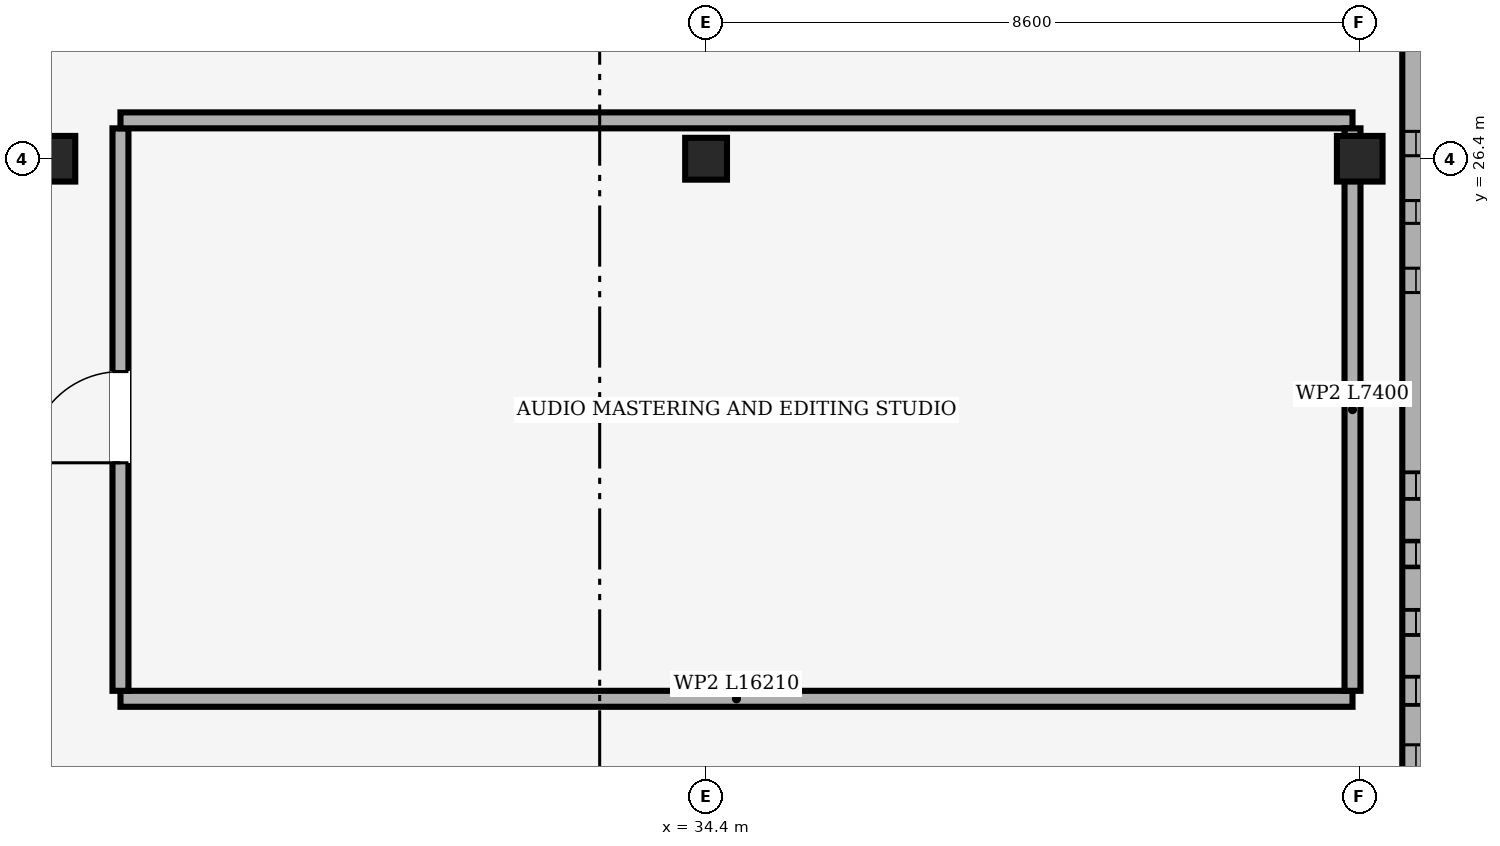
"""IFC4 building model, lengths in metres.
Left out: names, types, materials, properties, quantities, classifications, styles, units other than length and angle.
Written with IfcOpenShell. Run it as: python <this file> out.ifc"""

import sys

from ifc_helpers import new_model, si_unit, direction, frame, frame_2d, origin, origin_2d, place, context, subcontext, project, spatial, rectangle, extrude, element, fill, save


model = new_model("IFC4")
c1 = context("Model", 3, precision=1e-05, world=origin(), true_north=direction((0.0, 1.0)))
c2 = subcontext(c1, "Body", "Model", "MODEL_VIEW")
j1 = project(units=[si_unit("LENGTHUNIT", "METRE"), si_unit("PLANEANGLEUNIT", "RADIAN")], contexts=[c1])
p1 = place(None, origin())
s1 = spatial("IfcSite", under=j1, at=p1, CompositionType="ELEMENT")
p2 = place(p1, origin())
s2 = spatial("IfcBuilding", under=s1, at=p2, CompositionType="ELEMENT")
p3 = place(p2, frame((0.0, 0.0, 22.35)))
s3 = spatial("IfcBuildingStorey", under=s2, at=p3, CompositionType="ELEMENT", Elevation=22.35)
p4 = place(p3, frame((25.8, 26.4, 0.0), z_axis=(0.0, 0.0, 1.0), x_axis=(1.0, 0.0, 0.0)))
e1 = element("IfcColumn", 1, at=p4, inside=s3, PredefinedType="COLUMN", context=c2, shape_type="SweptSolid", body=[
    extrude(rectangle(XDim=0.6, YDim=0.6, at=origin_2d()), origin(), (0.0, 0.0, 1.0), 2.91),
])
p5 = place(p3, frame((34.4, 26.4, 0.0), z_axis=(0.0, 0.0, 1.0), x_axis=(1.0, 0.0, 0.0)))
e2 = element("IfcColumn", 2, at=p5, inside=s3, PredefinedType="COLUMN", context=c2, shape_type="SweptSolid", body=[
    extrude(rectangle(XDim=0.55, YDim=0.55, at=origin_2d()), origin(), (0.0, 0.0, 1.0), 2.91),
])
p6 = place(p3, frame((43.0, 26.4, 0.0), z_axis=(0.0, 0.0, 1.0), x_axis=(1.0, 0.0, 0.0)))
e3 = element("IfcColumn", 3, at=p6, inside=s3, PredefinedType="COLUMN", context=c2, shape_type="SweptSolid", body=[
    extrude(rectangle(XDim=0.6, YDim=0.6, at=origin_2d()), origin(), (0.0, 0.0, 1.0), 2.91),
])
p7 = place(p3, frame((43.74, 35.94, 0.0), z_axis=(0.0, 0.0, 1.0), x_axis=(0.0, -1.0, 0.0)))
e4 = element("IfcWall", 4, at=p7, inside=s3, PredefinedType="SOLIDWALL", context=c2, shape_type="SweptSolid", body=[
    extrude(rectangle(XDim=36.68, YDim=0.36, at=frame_2d((18.34, 0.0))), origin(), (0.0, 0.0, 1.0), 2.91),
])
p8 = place(p7, frame((9.18, 0.0, 0.36)))
e5 = element("IfcOpeningElement", 5, at=p8, cuts=e4, PredefinedType="OPENING", context=c2, shape_type="SweptSolid", body=[
    extrude(rectangle(XDim=0.32, YDim=0.32, at=frame_2d((0.16, 0.16))), frame((0.0, 0.18, 0.0), z_axis=(0.0, -1.0, 0.0), x_axis=(1.0, 0.0, 0.0)), (0.0, 0.0, 1.0), 0.36),
])
p9 = place(p7, frame((10.09, 0.0, 1.26)))
e6 = element("IfcOpeningElement", 6, at=p9, cuts=e4, PredefinedType="OPENING", context=c2, shape_type="SweptSolid", body=[
    extrude(rectangle(XDim=0.3, YDim=0.3, at=frame_2d((0.15, 0.15))), frame((0.0, 0.18, 0.0), z_axis=(0.0, -1.0, 0.0), x_axis=(1.0, 0.0, 0.0)), (0.0, 0.0, 1.0), 0.36),
])
p10 = place(p7, frame((10.98, 0.0, 1.26)))
e7 = element("IfcOpeningElement", 7, at=p10, cuts=e4, PredefinedType="OPENING", context=c2, shape_type="SweptSolid", body=[
    extrude(rectangle(XDim=0.32, YDim=0.32, at=frame_2d((0.16, 0.16))), frame((0.0, 0.18, 0.0), z_axis=(0.0, -1.0, 0.0), x_axis=(1.0, 0.0, 0.0)), (0.0, 0.0, 1.0), 0.36),
])
p11 = place(p7, frame((13.66, 0.0, 0.36)))
e8 = element("IfcOpeningElement", 8, at=p11, cuts=e4, PredefinedType="OPENING", context=c2, shape_type="SweptSolid", body=[
    extrude(rectangle(XDim=0.36, YDim=0.36, at=frame_2d((0.18, 0.18))), frame((0.0, 0.18, 0.0), z_axis=(0.0, -1.0, 0.0), x_axis=(1.0, 0.0, 0.0)), (0.0, 0.0, 1.0), 0.36),
])
p12 = place(p7, frame((13.67, 0.0, 1.26)))
e9 = element("IfcOpeningElement", 9, at=p12, cuts=e4, PredefinedType="OPENING", context=c2, shape_type="SweptSolid", body=[
    extrude(rectangle(XDim=0.34, YDim=0.34, at=frame_2d((0.17, 0.17))), frame((0.0, 0.18, 0.0), z_axis=(0.0, -1.0, 0.0), x_axis=(1.0, 0.0, 0.0)), (0.0, 0.0, 1.0), 0.36),
])
p13 = place(p7, frame((14.56, 0.0, 0.36)))
e10 = element("IfcOpeningElement", 10, at=p13, cuts=e4, PredefinedType="OPENING", context=c2, shape_type="SweptSolid", body=[
    extrude(rectangle(XDim=0.36, YDim=0.36, at=frame_2d((0.18, 0.18))), frame((0.0, 0.18, 0.0), z_axis=(0.0, -1.0, 0.0), x_axis=(1.0, 0.0, 0.0)), (0.0, 0.0, 1.0), 0.36),
])
p14 = place(p7, frame((14.58, 0.0, 2.16)))
e11 = element("IfcOpeningElement", 11, at=p14, cuts=e4, PredefinedType="OPENING", context=c2, shape_type="SweptSolid", body=[
    extrude(rectangle(XDim=0.32, YDim=0.32, at=frame_2d((0.16, 0.16))), frame((0.0, 0.18, 0.0), z_axis=(0.0, -1.0, 0.0), x_axis=(1.0, 0.0, 0.0)), (0.0, 0.0, 1.0), 0.36),
])
p15 = place(p7, frame((15.47, 0.0, 1.26)))
e12 = element("IfcOpeningElement", 12, at=p15, cuts=e4, PredefinedType="OPENING", context=c2, shape_type="SweptSolid", body=[
    extrude(rectangle(XDim=0.34, YDim=0.34, at=frame_2d((0.17, 0.17))), frame((0.0, 0.18, 0.0), z_axis=(0.0, -1.0, 0.0), x_axis=(1.0, 0.0, 0.0)), (0.0, 0.0, 1.0), 0.36),
])
p16 = place(p7, frame((15.48, 0.0, 2.16)))
e13 = element("IfcOpeningElement", 13, at=p16, cuts=e4, PredefinedType="OPENING", context=c2, shape_type="SweptSolid", body=[
    extrude(rectangle(XDim=0.32, YDim=0.32, at=frame_2d((0.16, 0.16))), frame((0.0, 0.18, 0.0), z_axis=(0.0, -1.0, 0.0), x_axis=(1.0, 0.0, 0.0)), (0.0, 0.0, 1.0), 0.36),
])
p17 = place(p7, frame((16.35, 0.0, 0.36)))
e14 = element("IfcOpeningElement", 14, at=p17, cuts=e4, PredefinedType="OPENING", context=c2, shape_type="SweptSolid", body=[
    extrude(rectangle(XDim=0.38, YDim=0.38, at=frame_2d((0.19, 0.19))), frame((0.0, 0.18, 0.0), z_axis=(0.0, -1.0, 0.0), x_axis=(1.0, 0.0, 0.0)), (0.0, 0.0, 1.0), 0.36),
])
p18 = place(p7, frame((16.36, 0.0, 1.26)))
e15 = element("IfcOpeningElement", 15, at=p18, cuts=e4, PredefinedType="OPENING", context=c2, shape_type="SweptSolid", body=[
    extrude(rectangle(XDim=0.36, YDim=0.36, at=frame_2d((0.18, 0.18))), frame((0.0, 0.18, 0.0), z_axis=(0.0, -1.0, 0.0), x_axis=(1.0, 0.0, 0.0)), (0.0, 0.0, 1.0), 0.36),
])
p19 = place(p7, frame((17.25, 0.0, 0.36)))
e16 = element("IfcOpeningElement", 16, at=p19, cuts=e4, PredefinedType="OPENING", context=c2, shape_type="SweptSolid", body=[
    extrude(rectangle(XDim=0.38, YDim=0.38, at=frame_2d((0.19, 0.19))), frame((0.0, 0.18, 0.0), z_axis=(0.0, -1.0, 0.0), x_axis=(1.0, 0.0, 0.0)), (0.0, 0.0, 1.0), 0.36),
])
p20 = place(p7, frame((18.16, 0.0, 1.26)))
e17 = element("IfcOpeningElement", 17, at=p20, cuts=e4, PredefinedType="OPENING", context=c2, shape_type="SweptSolid", body=[
    extrude(rectangle(XDim=0.36, YDim=0.36, at=frame_2d((0.18, 0.18))), frame((0.0, 0.18, 0.0), z_axis=(0.0, -1.0, 0.0), x_axis=(1.0, 0.0, 0.0)), (0.0, 0.0, 1.0), 0.36),
])
p21 = place(p7, frame((18.18, 0.0, 2.16)))
e18 = element("IfcOpeningElement", 18, at=p21, cuts=e4, PredefinedType="OPENING", context=c2, shape_type="SweptSolid", body=[
    extrude(rectangle(XDim=0.32, YDim=0.32, at=frame_2d((0.16, 0.16))), frame((0.0, 0.18, 0.0), z_axis=(0.0, -1.0, 0.0), x_axis=(1.0, 0.0, 0.0)), (0.0, 0.0, 1.0), 0.36),
])
p22 = place(p7, frame((19.05, 0.0, 0.36)))
e19 = element("IfcOpeningElement", 19, at=p22, cuts=e4, PredefinedType="OPENING", context=c2, shape_type="SweptSolid", body=[
    extrude(rectangle(XDim=0.38, YDim=0.38, at=frame_2d((0.19, 0.19))), frame((0.0, 0.18, 0.0), z_axis=(0.0, -1.0, 0.0), x_axis=(1.0, 0.0, 0.0)), (0.0, 0.0, 1.0), 0.36),
])
p23 = place(p7, frame((19.06, 0.0, 1.26)))
e20 = element("IfcOpeningElement", 20, at=p23, cuts=e4, PredefinedType="OPENING", context=c2, shape_type="SweptSolid", body=[
    extrude(rectangle(XDim=0.36, YDim=0.36, at=frame_2d((0.18, 0.18))), frame((0.0, 0.18, 0.0), z_axis=(0.0, -1.0, 0.0), x_axis=(1.0, 0.0, 0.0)), (0.0, 0.0, 1.0), 0.36),
])
p24 = place(p7, frame((19.95, 0.0, 0.36)))
e21 = element("IfcOpeningElement", 21, at=p24, cuts=e4, PredefinedType="OPENING", context=c2, shape_type="SweptSolid", body=[
    extrude(rectangle(XDim=0.38, YDim=0.38, at=frame_2d((0.19, 0.19))), frame((0.0, 0.18, 0.0), z_axis=(0.0, -1.0, 0.0), x_axis=(1.0, 0.0, 0.0)), (0.0, 0.0, 1.0), 0.36),
])
p25 = place(p7, frame((20.87, 0.0, 1.26)))
e22 = element("IfcOpeningElement", 22, at=p25, cuts=e4, PredefinedType="OPENING", context=c2, shape_type="SweptSolid", body=[
    extrude(rectangle(XDim=0.34, YDim=0.34, at=frame_2d((0.17, 0.17))), frame((0.0, 0.18, 0.0), z_axis=(0.0, -1.0, 0.0), x_axis=(1.0, 0.0, 0.0)), (0.0, 0.0, 1.0), 0.36),
])
p26 = place(p7, frame((21.76, 0.0, 0.36)))
e23 = element("IfcOpeningElement", 23, at=p26, cuts=e4, PredefinedType="OPENING", context=c2, shape_type="SweptSolid", body=[
    extrude(rectangle(XDim=0.36, YDim=0.36, at=frame_2d((0.18, 0.18))), frame((0.0, 0.18, 0.0), z_axis=(0.0, -1.0, 0.0), x_axis=(1.0, 0.0, 0.0)), (0.0, 0.0, 1.0), 0.36),
])
p27 = place(p7, frame((21.77, 0.0, 1.26)))
e24 = element("IfcOpeningElement", 24, at=p27, cuts=e4, PredefinedType="OPENING", context=c2, shape_type="SweptSolid", body=[
    extrude(rectangle(XDim=0.34, YDim=0.34, at=frame_2d((0.17, 0.17))), frame((0.0, 0.18, 0.0), z_axis=(0.0, -1.0, 0.0), x_axis=(1.0, 0.0, 0.0)), (0.0, 0.0, 1.0), 0.36),
])
p28 = place(p7, frame((22.66, 0.0, 0.36)))
e25 = element("IfcOpeningElement", 25, at=p28, cuts=e4, PredefinedType="OPENING", context=c2, shape_type="SweptSolid", body=[
    extrude(rectangle(XDim=0.36, YDim=0.36, at=frame_2d((0.18, 0.18))), frame((0.0, 0.18, 0.0), z_axis=(0.0, -1.0, 0.0), x_axis=(1.0, 0.0, 0.0)), (0.0, 0.0, 1.0), 0.36),
])
p29 = place(p7, frame((24.48, 0.0, 1.26)))
e26 = element("IfcOpeningElement", 26, at=p29, cuts=e4, PredefinedType="OPENING", context=c2, shape_type="SweptSolid", body=[
    extrude(rectangle(XDim=0.32, YDim=0.32, at=frame_2d((0.16, 0.16))), frame((0.0, 0.18, 0.0), z_axis=(0.0, -1.0, 0.0), x_axis=(1.0, 0.0, 0.0)), (0.0, 0.0, 1.0), 0.36),
])
p30 = place(p7, frame((25.39, 0.0, 2.16)))
e27 = element("IfcOpeningElement", 27, at=p30, cuts=e4, PredefinedType="OPENING", context=c2, shape_type="SweptSolid", body=[
    extrude(rectangle(XDim=0.3, YDim=0.3, at=frame_2d((0.15, 0.15))), frame((0.0, 0.18, 0.0), z_axis=(0.0, -1.0, 0.0), x_axis=(1.0, 0.0, 0.0)), (0.0, 0.0, 1.0), 0.36),
])
p31 = place(p7, frame((26.3, 0.0, 2.16)))
e28 = element("IfcOpeningElement", 28, at=p31, cuts=e4, PredefinedType="OPENING", context=c2, shape_type="SweptSolid", body=[
    extrude(rectangle(XDim=0.28, YDim=0.28, at=frame_2d((0.14, 0.14))), frame((0.0, 0.18, 0.0), z_axis=(0.0, -1.0, 0.0), x_axis=(1.0, 0.0, 0.0)), (0.0, 0.0, 1.0), 0.36),
])
p32 = place(p7, frame((27.18, 0.0, 0.36)))
e29 = element("IfcOpeningElement", 29, at=p32, cuts=e4, PredefinedType="OPENING", context=c2, shape_type="SweptSolid", body=[
    extrude(rectangle(XDim=0.32, YDim=0.32, at=frame_2d((0.16, 0.16))), frame((0.0, 0.18, 0.0), z_axis=(0.0, -1.0, 0.0), x_axis=(1.0, 0.0, 0.0)), (0.0, 0.0, 1.0), 0.36),
])
p33 = place(p7, frame((28.09, 0.0, 0.36)))
e30 = element("IfcOpeningElement", 30, at=p33, cuts=e4, PredefinedType="OPENING", context=c2, shape_type="SweptSolid", body=[
    extrude(rectangle(XDim=0.3, YDim=0.3, at=frame_2d((0.15, 0.15))), frame((0.0, 0.18, 0.0), z_axis=(0.0, -1.0, 0.0), x_axis=(1.0, 0.0, 0.0)), (0.0, 0.0, 1.0), 0.36),
])
p34 = place(p3, frame((42.905, 19.295, 0.0), z_axis=(0.0, 0.0, 1.0), x_axis=(-1.0, 0.0, 0.0)))
e31 = element("IfcWall", 31, at=p34, inside=s3, PredefinedType="PARTITIONING", context=c2, shape_type="SweptSolid", body=[
    extrude(rectangle(XDim=16.21, YDim=0.21, at=frame_2d((8.105, 0.0))), origin(), (0.0, 0.0, 1.0), 2.89),
])
p35 = place(p3, frame((26.695, 19.4, 0.0), z_axis=(0.0, 0.0, 1.0), x_axis=(0.0, 1.0, 0.0)))
e32 = element("IfcWall", 32, at=p35, inside=s3, PredefinedType="PARTITIONING", context=c2, shape_type="SweptSolid", body=[
    extrude(rectangle(XDim=7.4, YDim=0.21, at=frame_2d((3.7, 0.0))), origin(), (0.0, 0.0, 1.0), 2.89),
])
p36 = place(p35, frame((3.0, 0.0, 0.0)))
e33 = element("IfcOpeningElement", 33, at=p36, cuts=e32, PredefinedType="OPENING", context=c2, shape_type="SweptSolid", body=[
    extrude(rectangle(XDim=1.2, YDim=2.15, at=frame_2d((0.6, 1.075))), frame((0.0, 0.105, 0.0), z_axis=(0.0, -1.0, 0.0), x_axis=(1.0, 0.0, 0.0)), (0.0, 0.0, 1.0), 0.21),
])
p37 = place(p3, frame((26.695, 26.905, 0.0), z_axis=(0.0, 0.0, 1.0), x_axis=(1.0, 0.0, 0.0)))
e34 = element("IfcWall", 34, at=p37, inside=s3, PredefinedType="PARTITIONING", context=c2, shape_type="SweptSolid", body=[
    extrude(rectangle(XDim=16.21, YDim=0.21, at=frame_2d((8.105, 0.0))), origin(), (0.0, 0.0, 1.0), 2.89),
])
p38 = place(p3, frame((42.905, 26.8, 0.0), z_axis=(0.0, 0.0, 1.0), x_axis=(0.0, -1.0, 0.0)))
e35 = element("IfcWall", 35, at=p38, inside=s3, PredefinedType="PARTITIONING", context=c2, shape_type="SweptSolid", body=[
    extrude(rectangle(XDim=7.4, YDim=0.21, at=frame_2d((3.7, 0.0))), origin(), (0.0, 0.0, 1.0), 2.34),
])
p39 = place(p8, origin())
e36 = element("IfcWindow", 36, at=p39, inside=s3, PartitioningType="SINGLE_PANEL", PredefinedType="WINDOW", context=c2, shape_type="SweptSolid", body=[
    extrude(rectangle(XDim=0.32, YDim=0.32, at=frame_2d((0.16, 0.16))), frame((0.0, -0.07, 0.0), z_axis=(0.0, -1.0, 0.0), x_axis=(1.0, 0.0, 0.0)), (0.0, 0.0, 1.0), 0.06),
])
fill(e5, e36)
p40 = place(p9, origin())
e37 = element("IfcWindow", 37, at=p40, inside=s3, PartitioningType="SINGLE_PANEL", PredefinedType="WINDOW", context=c2, shape_type="SweptSolid", body=[
    extrude(rectangle(XDim=0.3, YDim=0.3, at=frame_2d((0.15, 0.15))), frame((0.0, -0.07, 0.0), z_axis=(0.0, -1.0, 0.0), x_axis=(1.0, 0.0, 0.0)), (0.0, 0.0, 1.0), 0.06),
])
fill(e6, e37)
p41 = place(p10, origin())
e38 = element("IfcWindow", 38, at=p41, inside=s3, PartitioningType="SINGLE_PANEL", PredefinedType="WINDOW", context=c2, shape_type="SweptSolid", body=[
    extrude(rectangle(XDim=0.32, YDim=0.32, at=frame_2d((0.16, 0.16))), frame((0.0, -0.07, 0.0), z_axis=(0.0, -1.0, 0.0), x_axis=(1.0, 0.0, 0.0)), (0.0, 0.0, 1.0), 0.06),
])
fill(e7, e38)
p42 = place(p11, origin())
e39 = element("IfcWindow", 39, at=p42, inside=s3, PartitioningType="SINGLE_PANEL", PredefinedType="WINDOW", context=c2, shape_type="SweptSolid", body=[
    extrude(rectangle(XDim=0.36, YDim=0.36, at=frame_2d((0.18, 0.18))), frame((0.0, -0.07, 0.0), z_axis=(0.0, -1.0, 0.0), x_axis=(1.0, 0.0, 0.0)), (0.0, 0.0, 1.0), 0.06),
])
fill(e8, e39)
p43 = place(p12, origin())
e40 = element("IfcWindow", 40, at=p43, inside=s3, PartitioningType="SINGLE_PANEL", PredefinedType="WINDOW", context=c2, shape_type="SweptSolid", body=[
    extrude(rectangle(XDim=0.34, YDim=0.34, at=frame_2d((0.17, 0.17))), frame((0.0, -0.07, 0.0), z_axis=(0.0, -1.0, 0.0), x_axis=(1.0, 0.0, 0.0)), (0.0, 0.0, 1.0), 0.06),
])
fill(e9, e40)
p44 = place(p13, origin())
e41 = element("IfcWindow", 41, at=p44, inside=s3, PartitioningType="SINGLE_PANEL", PredefinedType="WINDOW", context=c2, shape_type="SweptSolid", body=[
    extrude(rectangle(XDim=0.36, YDim=0.36, at=frame_2d((0.18, 0.18))), frame((0.0, -0.07, 0.0), z_axis=(0.0, -1.0, 0.0), x_axis=(1.0, 0.0, 0.0)), (0.0, 0.0, 1.0), 0.06),
])
fill(e10, e41)
p45 = place(p14, origin())
e42 = element("IfcWindow", 42, at=p45, inside=s3, PartitioningType="SINGLE_PANEL", PredefinedType="WINDOW", context=c2, shape_type="SweptSolid", body=[
    extrude(rectangle(XDim=0.32, YDim=0.32, at=frame_2d((0.16, 0.16))), frame((0.0, -0.07, 0.0), z_axis=(0.0, -1.0, 0.0), x_axis=(1.0, 0.0, 0.0)), (0.0, 0.0, 1.0), 0.06),
])
fill(e11, e42)
p46 = place(p15, origin())
e43 = element("IfcWindow", 43, at=p46, inside=s3, PartitioningType="SINGLE_PANEL", PredefinedType="WINDOW", context=c2, shape_type="SweptSolid", body=[
    extrude(rectangle(XDim=0.34, YDim=0.34, at=frame_2d((0.17, 0.17))), frame((0.0, -0.07, 0.0), z_axis=(0.0, -1.0, 0.0), x_axis=(1.0, 0.0, 0.0)), (0.0, 0.0, 1.0), 0.06),
])
fill(e12, e43)
p47 = place(p16, origin())
e44 = element("IfcWindow", 44, at=p47, inside=s3, PartitioningType="SINGLE_PANEL", PredefinedType="WINDOW", context=c2, shape_type="SweptSolid", body=[
    extrude(rectangle(XDim=0.32, YDim=0.32, at=frame_2d((0.16, 0.16))), frame((0.0, -0.07, 0.0), z_axis=(0.0, -1.0, 0.0), x_axis=(1.0, 0.0, 0.0)), (0.0, 0.0, 1.0), 0.06),
])
fill(e13, e44)
p48 = place(p17, origin())
e45 = element("IfcWindow", 45, at=p48, inside=s3, PartitioningType="SINGLE_PANEL", PredefinedType="WINDOW", context=c2, shape_type="SweptSolid", body=[
    extrude(rectangle(XDim=0.38, YDim=0.38, at=frame_2d((0.19, 0.19))), frame((0.0, -0.07, 0.0), z_axis=(0.0, -1.0, 0.0), x_axis=(1.0, 0.0, 0.0)), (0.0, 0.0, 1.0), 0.06),
])
fill(e14, e45)
p49 = place(p18, origin())
e46 = element("IfcWindow", 46, at=p49, inside=s3, PartitioningType="SINGLE_PANEL", PredefinedType="WINDOW", context=c2, shape_type="SweptSolid", body=[
    extrude(rectangle(XDim=0.36, YDim=0.36, at=frame_2d((0.18, 0.18))), frame((0.0, -0.07, 0.0), z_axis=(0.0, -1.0, 0.0), x_axis=(1.0, 0.0, 0.0)), (0.0, 0.0, 1.0), 0.06),
])
fill(e15, e46)
p50 = place(p19, origin())
e47 = element("IfcWindow", 47, at=p50, inside=s3, PartitioningType="SINGLE_PANEL", PredefinedType="WINDOW", context=c2, shape_type="SweptSolid", body=[
    extrude(rectangle(XDim=0.38, YDim=0.38, at=frame_2d((0.19, 0.19))), frame((0.0, -0.07, 0.0), z_axis=(0.0, -1.0, 0.0), x_axis=(1.0, 0.0, 0.0)), (0.0, 0.0, 1.0), 0.06),
])
fill(e16, e47)
p51 = place(p36, origin())
e48 = element("IfcDoor", 48, at=p51, inside=s3, OperationType="SINGLE_SWING_LEFT", PredefinedType="DOOR", context=c2, shape_type="SweptSolid", body=[
    extrude(rectangle(XDim=1.2, YDim=2.15, at=frame_2d((0.6, 1.075))), frame((0.0, 0.025, 0.0), z_axis=(0.0, -1.0, 0.0), x_axis=(1.0, 0.0, 0.0)), (0.0, 0.0, 1.0), 0.05),
])
fill(e33, e48)
save(model, sys.argv[1])
